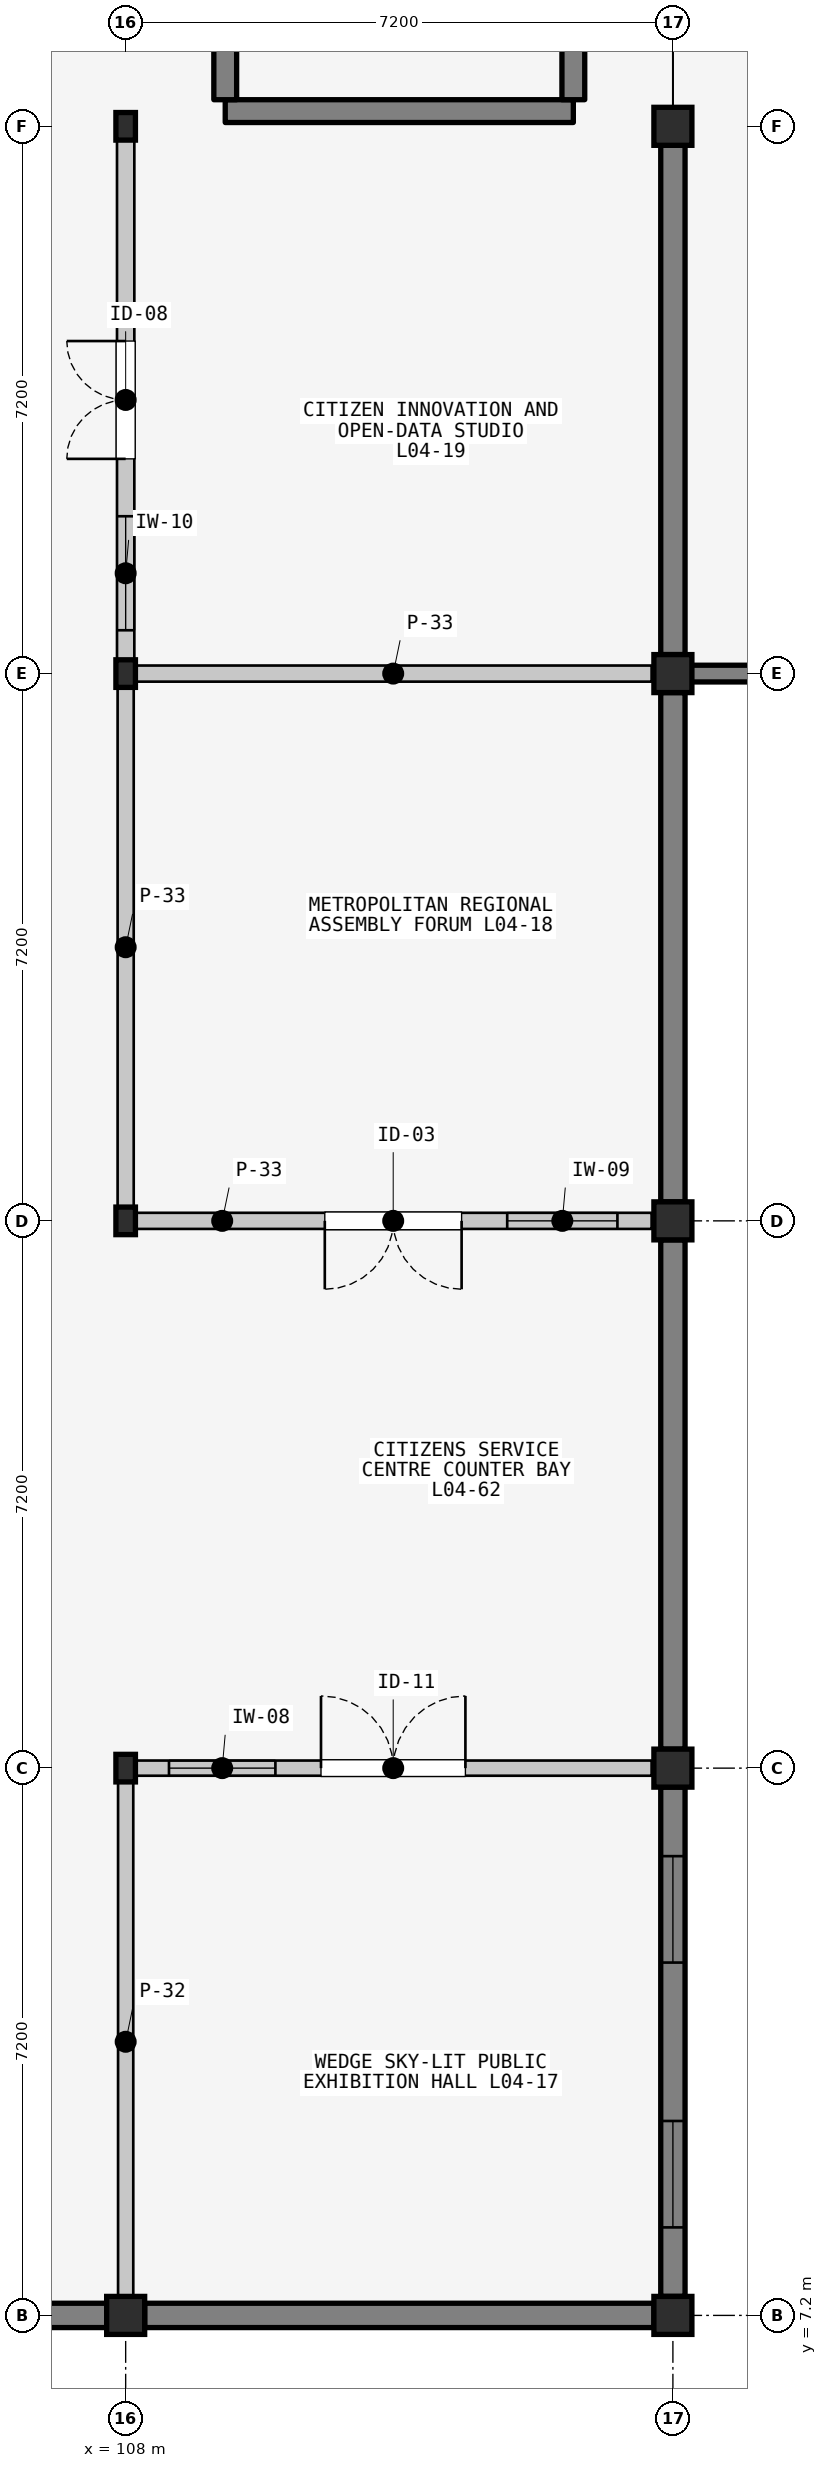
"""IFC4 building model, lengths in metres.
Left out: names, types, materials, properties, quantities, classifications, styles, units other than length and angle.
Written with IfcOpenShell. Run it as: python <this file> out.ifc"""

import sys

from ifc_helpers import new_model, si_unit, direction, frame, frame_2d, origin, origin_2d, place, context, subcontext, project, spatial, rectangle, i_section, extrude, element, fill, save


model = new_model("IFC4")
c1 = context("Model", 3, precision=1e-05, world=origin(), true_north=direction((0.0, 1.0)))
c2 = subcontext(c1, "Body", "Model", "MODEL_VIEW")
j1 = project(units=[si_unit("LENGTHUNIT", "METRE"), si_unit("PLANEANGLEUNIT", "RADIAN")], contexts=[c1])
p1 = place(None, origin())
s1 = spatial("IfcSite", under=j1, at=p1, CompositionType="ELEMENT")
p2 = place(p1, origin())
s2 = spatial("IfcBuilding", under=s1, at=p2, CompositionType="ELEMENT")
p3 = place(p2, frame((0.0, 0.0, 14.1)))
s3 = spatial("IfcBuildingStorey", under=s2, at=p3, CompositionType="ELEMENT", Elevation=14.1)
p4 = place(p3, frame((108.0, 7.2, 0.0), z_axis=(0.0, 0.0, 1.0), x_axis=(1.0, 0.0, 0.0)))
e1 = element("IfcColumn", 1, at=p4, inside=s3, PredefinedType="COLUMN", context=c2, shape_type="SweptSolid", body=[
    extrude(rectangle(XDim=0.5, YDim=0.5, at=origin_2d()), origin(), (0.0, 0.0, 1.0), 5.048),
])
p5 = place(p3, frame((108.0, 14.4, 0.0), z_axis=(0.0, 0.0, 1.0), x_axis=(1.0, 0.0, 0.0)))
e2 = element("IfcColumn", 2, at=p5, inside=s3, PredefinedType="COLUMN", context=c2, shape_type="SweptSolid", body=[
    extrude(i_section(OverallWidth=0.257, OverallDepth=0.363, WebThickness=0.013, FlangeThickness=0.022, FilletRadius=0.015, at=origin_2d()), origin(), (0.0, 0.0, 1.0), 6.39),
])
p6 = place(p3, frame((108.0, 21.6, 0.0), z_axis=(0.0, 0.0, 1.0), x_axis=(1.0, 0.0, 0.0)))
e3 = element("IfcColumn", 3, at=p6, inside=s3, PredefinedType="COLUMN", context=c2, shape_type="SweptSolid", body=[
    extrude(i_section(OverallWidth=0.257, OverallDepth=0.363, WebThickness=0.013, FlangeThickness=0.022, FilletRadius=0.015, at=origin_2d()), origin(), (0.0, 0.0, 1.0), 7.733),
])
p7 = place(p3, frame((108.0, 28.8, 0.0), z_axis=(0.0, 0.0, 1.0), x_axis=(1.0, 0.0, 0.0)))
e4 = element("IfcColumn", 4, at=p7, inside=s3, PredefinedType="COLUMN", context=c2, shape_type="SweptSolid", body=[
    extrude(i_section(OverallWidth=0.257, OverallDepth=0.363, WebThickness=0.013, FlangeThickness=0.022, FilletRadius=0.015, at=origin_2d()), origin(), (0.0, 0.0, 1.0), 9.076),
])
p8 = place(p3, frame((108.0, 36.0, 0.0), z_axis=(0.0, 0.0, 1.0), x_axis=(1.0, 0.0, 0.0)))
e5 = element("IfcColumn", 5, at=p8, inside=s3, PredefinedType="COLUMN", context=c2, shape_type="SweptSolid", body=[
    extrude(i_section(OverallWidth=0.257, OverallDepth=0.363, WebThickness=0.013, FlangeThickness=0.022, FilletRadius=0.015, at=origin_2d()), origin(), (0.0, 0.0, 1.0), 10.419),
])
p9 = place(p3, frame((115.2, 7.2, 0.0), z_axis=(0.0, 0.0, 1.0), x_axis=(1.0, 0.0, 0.0)))
e6 = element("IfcColumn", 6, at=p9, inside=s3, PredefinedType="COLUMN", context=c2, shape_type="SweptSolid", body=[
    extrude(rectangle(XDim=0.5, YDim=0.5, at=origin_2d()), origin(), (0.0, 0.0, 1.0), 5.076),
])
p10 = place(p3, frame((115.2, 14.4, 0.0), z_axis=(0.0, 0.0, 1.0), x_axis=(1.0, 0.0, 0.0)))
e7 = element("IfcColumn", 7, at=p10, inside=s3, PredefinedType="COLUMN", context=c2, shape_type="SweptSolid", body=[
    extrude(rectangle(XDim=0.5, YDim=0.5, at=origin_2d()), origin(), (0.0, 0.0, 1.0), 6.419),
])
p11 = place(p3, frame((115.2, 21.6, 0.0), z_axis=(0.0, 0.0, 1.0), x_axis=(1.0, 0.0, 0.0)))
e8 = element("IfcColumn", 8, at=p11, inside=s3, PredefinedType="COLUMN", context=c2, shape_type="SweptSolid", body=[
    extrude(rectangle(XDim=0.5, YDim=0.5, at=origin_2d()), origin(), (0.0, 0.0, 1.0), 7.762),
])
p12 = place(p3, frame((115.2, 28.8, 0.0), z_axis=(0.0, 0.0, 1.0), x_axis=(1.0, 0.0, 0.0)))
e9 = element("IfcColumn", 9, at=p12, inside=s3, PredefinedType="COLUMN", context=c2, shape_type="SweptSolid", body=[
    extrude(rectangle(XDim=0.5, YDim=0.5, at=origin_2d()), origin(), (0.0, 0.0, 1.0), 9.105),
])
p13 = place(p3, frame((115.2, 36.0, 0.0), z_axis=(0.0, 0.0, 1.0), x_axis=(1.0, 0.0, 0.0)))
e10 = element("IfcColumn", 10, at=p13, inside=s3, PredefinedType="COLUMN", context=c2, shape_type="SweptSolid", body=[
    extrude(rectangle(XDim=0.5, YDim=0.5, at=origin_2d()), origin(), (0.0, 0.0, 1.0), 10.448),
])
p14 = place(p3, frame((107.75, 7.2, 0.0), z_axis=(0.0, 0.0, 1.0), x_axis=(-1.0, 0.0, 0.0)))
e11 = element("IfcWall", 11, at=p14, inside=s3, PredefinedType="SOLIDWALL", context=c2, shape_type="SweptSolid", body=[
    extrude(rectangle(XDim=6.7, YDim=0.32, at=frame_2d((3.35, 0.0))), origin(), (0.0, 0.0, 1.0), 4.292),
])
p15 = place(p14, frame((0.908, 0.0, 0.95)))
e12 = element("IfcOpeningElement", 12, at=p15, cuts=e11, PredefinedType="OPENING", context=c2, shape_type="SweptSolid", body=[
    extrude(rectangle(XDim=1.4, YDim=2.1, at=frame_2d((0.7, 1.05))), frame((0.0, 0.17, 0.0), z_axis=(0.0, -1.0, 0.0), x_axis=(1.0, 0.0, 0.0)), (0.0, 0.0, 1.0), 0.34),
])
p16 = place(p14, frame((4.392, 0.0, 0.95)))
e13 = element("IfcOpeningElement", 13, at=p16, cuts=e11, PredefinedType="OPENING", context=c2, shape_type="SweptSolid", body=[
    extrude(rectangle(XDim=1.4, YDim=2.1, at=frame_2d((0.7, 1.05))), frame((0.0, 0.17, 0.0), z_axis=(0.0, -1.0, 0.0), x_axis=(1.0, 0.0, 0.0)), (0.0, 0.0, 1.0), 0.34),
])
p17 = place(p3, frame((114.95, 7.2, 0.0), z_axis=(0.0, 0.0, 1.0), x_axis=(-1.0, 0.0, 0.0)))
e14 = element("IfcWall", 14, at=p17, inside=s3, PredefinedType="SOLIDWALL", context=c2, shape_type="SweptSolid", body=[
    extrude(rectangle(XDim=6.7, YDim=0.32, at=frame_2d((3.35, 0.0))), origin(), (0.0, 0.0, 1.0), 4.321),
])
p18 = place(p3, frame((115.2, 14.15, 0.0), z_axis=(0.0, 0.0, 1.0), x_axis=(0.0, -1.0, 0.0)))
e15 = element("IfcWall", 15, at=p18, inside=s3, PredefinedType="SOLIDWALL", context=c2, shape_type="SweptSolid", body=[
    extrude(rectangle(XDim=6.7, YDim=0.32, at=frame_2d((3.35, 0.0))), origin(), (0.0, 0.0, 1.0), 4.393),
])
p19 = place(p18, frame((0.908, 0.0, 0.95)))
e16 = element("IfcOpeningElement", 16, at=p19, cuts=e15, PredefinedType="OPENING", context=c2, shape_type="SweptSolid", body=[
    extrude(rectangle(XDim=1.4, YDim=2.1, at=frame_2d((0.7, 1.05))), frame((0.0, 0.17, 0.0), z_axis=(0.0, -1.0, 0.0), x_axis=(1.0, 0.0, 0.0)), (0.0, 0.0, 1.0), 0.34),
])
p20 = place(p18, frame((4.392, 0.0, 0.95)))
e17 = element("IfcOpeningElement", 17, at=p20, cuts=e15, PredefinedType="OPENING", context=c2, shape_type="SweptSolid", body=[
    extrude(rectangle(XDim=1.4, YDim=2.1, at=frame_2d((0.7, 1.05))), frame((0.0, 0.17, 0.0), z_axis=(0.0, -1.0, 0.0), x_axis=(1.0, 0.0, 0.0)), (0.0, 0.0, 1.0), 0.34),
])
p21 = place(p3, frame((115.2, 21.35, 0.0), z_axis=(0.0, 0.0, 1.0), x_axis=(0.0, -1.0, 0.0)))
e18 = element("IfcWall", 18, at=p21, inside=s3, PredefinedType="SOLIDWALL", context=c2, shape_type="SweptSolid", body=[
    extrude(rectangle(XDim=6.7, YDim=0.32, at=frame_2d((3.35, 0.0))), origin(), (0.0, 0.0, 1.0), 5.736),
])
p22 = place(p3, frame((115.2, 28.55, 0.0), z_axis=(0.0, 0.0, 1.0), x_axis=(0.0, -1.0, 0.0)))
e19 = element("IfcWall", 19, at=p22, inside=s3, PredefinedType="SOLIDWALL", context=c2, shape_type="SweptSolid", body=[
    extrude(rectangle(XDim=6.7, YDim=0.32, at=frame_2d((3.35, 0.0))), origin(), (0.0, 0.0, 1.0), 7.079),
])
p23 = place(p3, frame((115.2, 35.75, 0.0), z_axis=(0.0, 0.0, 1.0), x_axis=(0.0, -1.0, 0.0)))
e20 = element("IfcWall", 20, at=p23, inside=s3, PredefinedType="SOLIDWALL", context=c2, shape_type="SweptSolid", body=[
    extrude(rectangle(XDim=6.7, YDim=0.32, at=frame_2d((3.35, 0.0))), origin(), (0.0, 0.0, 1.0), 8.422),
])
p24 = place(p3, frame((122.25, 28.8, 0.0), z_axis=(0.0, 0.0, 1.0), x_axis=(-1.0, 0.0, 0.0)))
e21 = element("IfcWall", 21, at=p24, inside=s3, PredefinedType="PARAPET", context=c2, shape_type="SweptSolid", body=[
    extrude(rectangle(XDim=6.9, YDim=0.22, at=frame_2d((3.45, 0.0))), origin(), (0.0, 0.0, 1.0), 0.85),
])
p25 = place(p3, frame((109.31, 36.2, 0.0), z_axis=(0.0, 0.0, 1.0), x_axis=(1.0, 0.0, 0.0)))
e22 = element("IfcWall", 22, at=p25, inside=s3, PredefinedType="SHEAR", context=c2, shape_type="SweptSolid", body=[
    extrude(rectangle(XDim=4.58, YDim=0.3, at=frame_2d((2.29, 0.0))), origin(), (0.0, 0.0, 1.0), 3.72),
])
for number, where, z_axis, x_axis in (
    (23, (109.31, 36.35, 0.0), (0.0, 0.0, 1.0), (0.0, 1.0, 0.0)),
    (24, (113.89, 36.35, 0.0), (0.0, 0.0, 1.0), (0.0, 1.0, 0.0)),
):
    element("IfcWall", number, at=place(p3, frame(where, z_axis=z_axis, x_axis=x_axis)), inside=s3, PredefinedType="SHEAR", context=c2, shape_type="SweptSolid", body=[
        extrude(rectangle(XDim=9.3, YDim=0.3, at=frame_2d((4.65, 0.0))), origin(), (0.0, 0.0, 1.0), 3.72),
    ])
p26 = place(p3, frame((108.12, 14.4, 0.0), z_axis=(0.0, 0.0, 1.0), x_axis=(1.0, 0.0, 0.0)))
e25 = element("IfcWall", 25, at=p26, inside=s3, PredefinedType="PARTITIONING", context=c2, shape_type="SweptSolid", body=[
    extrude(rectangle(XDim=6.8, YDim=0.2, at=frame_2d((3.4, 0.0))), origin(), (0.0, 0.0, 1.0), 3.72),
])
p27 = place(p26, frame((2.45, 0.0, 0.0)))
e26 = element("IfcOpeningElement", 26, at=p27, cuts=e25, PredefinedType="OPENING", context=c2, shape_type="SweptSolid", body=[
    extrude(rectangle(XDim=1.9, YDim=2.45, at=frame_2d((0.95, 1.225))), frame((0.0, 0.11, 0.0), z_axis=(0.0, -1.0, 0.0), x_axis=(1.0, 0.0, 0.0)), (0.0, 0.0, 1.0), 0.22),
])
p28 = place(p26, frame((0.45, 0.0, 1.05)))
e27 = element("IfcOpeningElement", 27, at=p28, cuts=e25, PredefinedType="OPENING", context=c2, shape_type="SweptSolid", body=[
    extrude(rectangle(XDim=1.4, YDim=1.2, at=frame_2d((0.7, 0.6))), frame((0.0, 0.11, 0.0), z_axis=(0.0, -1.0, 0.0), x_axis=(1.0, 0.0, 0.0)), (0.0, 0.0, 1.0), 0.22),
])
p29 = place(p3, frame((108.0, 7.32, 0.0), z_axis=(0.0, 0.0, 1.0), x_axis=(0.0, 1.0, 0.0)))
e28 = element("IfcWall", 28, at=p29, inside=s3, PredefinedType="PARTITIONING", context=c2, shape_type="SweptSolid", body=[
    extrude(rectangle(XDim=6.96, YDim=0.2, at=frame_2d((3.48, 0.0))), origin(), (0.0, 0.0, 1.0), 3.72),
])
p30 = place(p3, frame((114.92, 21.6, 0.0), z_axis=(0.0, 0.0, 1.0), x_axis=(-1.0, 0.0, 0.0)))
e29 = element("IfcWall", 29, at=p30, inside=s3, PredefinedType="PARTITIONING", context=c2, shape_type="SweptSolid", body=[
    extrude(rectangle(XDim=6.8, YDim=0.212, at=frame_2d((3.4, 0.0))), origin(), (0.0, 0.0, 1.0), 3.72),
])
p31 = place(p30, frame((2.5, 0.0, 0.0)))
e30 = element("IfcOpeningElement", 30, at=p31, cuts=e29, PredefinedType="OPENING", context=c2, shape_type="SweptSolid", body=[
    extrude(rectangle(XDim=1.8, YDim=2.4, at=frame_2d((0.9, 1.2))), frame((0.0, 0.116, 0.0), z_axis=(0.0, -1.0, 0.0), x_axis=(1.0, 0.0, 0.0)), (0.0, 0.0, 1.0), 0.232),
])
p32 = place(p30, frame((0.45, 0.0, 1.05)))
e31 = element("IfcOpeningElement", 31, at=p32, cuts=e29, PredefinedType="OPENING", context=c2, shape_type="SweptSolid", body=[
    extrude(rectangle(XDim=1.45, YDim=1.15, at=frame_2d((0.725, 0.575))), frame((0.0, 0.116, 0.0), z_axis=(0.0, -1.0, 0.0), x_axis=(1.0, 0.0, 0.0)), (0.0, 0.0, 1.0), 0.232),
])
p33 = place(p3, frame((108.12, 28.8, 0.0), z_axis=(0.0, 0.0, 1.0), x_axis=(1.0, 0.0, 0.0)))
e32 = element("IfcWall", 32, at=p33, inside=s3, PredefinedType="PARTITIONING", context=c2, shape_type="SweptSolid", body=[
    extrude(rectangle(XDim=6.8, YDim=0.212, at=frame_2d((3.4, 0.0))), origin(), (0.0, 0.0, 1.0), 3.72),
])
p34 = place(p3, frame((108.0, 21.72, 0.0), z_axis=(0.0, 0.0, 1.0), x_axis=(0.0, 1.0, 0.0)))
e33 = element("IfcWall", 33, at=p34, inside=s3, PredefinedType="PARTITIONING", context=c2, shape_type="SweptSolid", body=[
    extrude(rectangle(XDim=6.96, YDim=0.212, at=frame_2d((3.48, 0.0))), origin(), (0.0, 0.0, 1.0), 3.72),
])
p35 = place(p3, frame((108.0, 28.92, 0.0), z_axis=(0.0, 0.0, 1.0), x_axis=(0.0, 1.0, 0.0)))
e34 = element("IfcWall", 34, at=p35, inside=s3, PredefinedType="PARTITIONING", context=c2, shape_type="SweptSolid", body=[
    extrude(rectangle(XDim=6.96, YDim=0.228, at=frame_2d((3.48, 0.0))), origin(), (0.0, 0.0, 1.0), 3.72),
])
p36 = place(p35, frame((2.705, 0.0, 0.0)))
e35 = element("IfcOpeningElement", 35, at=p36, cuts=e34, PredefinedType="OPENING", context=c2, shape_type="SweptSolid", body=[
    extrude(rectangle(XDim=1.55, YDim=2.3, at=frame_2d((0.775, 1.15))), frame((0.0, 0.124, 0.0), z_axis=(0.0, -1.0, 0.0), x_axis=(1.0, 0.0, 0.0)), (0.0, 0.0, 1.0), 0.248),
])
p37 = place(p35, frame((0.45, 0.0, 1.05)))
e36 = element("IfcOpeningElement", 36, at=p37, cuts=e34, PredefinedType="OPENING", context=c2, shape_type="SweptSolid", body=[
    extrude(rectangle(XDim=1.5, YDim=1.15, at=frame_2d((0.75, 0.575))), frame((0.0, 0.124, 0.0), z_axis=(0.0, -1.0, 0.0), x_axis=(1.0, 0.0, 0.0)), (0.0, 0.0, 1.0), 0.248),
])
p38 = place(p19, origin())
e37 = element("IfcWindow", 37, at=p38, inside=s3, PartitioningType="SINGLE_PANEL", PredefinedType="WINDOW", context=c2, shape_type="SweptSolid", body=[
    extrude(rectangle(XDim=1.4, YDim=2.1, at=frame_2d((0.7, 1.05))), frame((0.0, 0.03, 0.0), z_axis=(0.0, -1.0, 0.0), x_axis=(1.0, 0.0, 0.0)), (0.0, 0.0, 1.0), 0.06),
])
fill(e16, e37)
p39 = place(p20, origin())
e38 = element("IfcWindow", 38, at=p39, inside=s3, PartitioningType="SINGLE_PANEL", PredefinedType="WINDOW", context=c2, shape_type="SweptSolid", body=[
    extrude(rectangle(XDim=1.4, YDim=2.1, at=frame_2d((0.7, 1.05))), frame((0.0, 0.03, 0.0), z_axis=(0.0, -1.0, 0.0), x_axis=(1.0, 0.0, 0.0)), (0.0, 0.0, 1.0), 0.06),
])
fill(e17, e38)
p40 = place(p27, origin())
e39 = element("IfcDoor", 39, at=p40, inside=s3, OperationType="DOUBLE_DOOR_SINGLE_SWING", PredefinedType="DOOR", context=c2, shape_type="SweptSolid", body=[
    extrude(rectangle(XDim=1.9, YDim=2.45, at=frame_2d((0.95, 1.225))), frame((0.0, 0.025, 0.0), z_axis=(0.0, -1.0, 0.0), x_axis=(1.0, 0.0, 0.0)), (0.0, 0.0, 1.0), 0.05),
])
fill(e26, e39)
p41 = place(p28, origin())
e40 = element("IfcWindow", 40, at=p41, inside=s3, PartitioningType="SINGLE_PANEL", PredefinedType="WINDOW", context=c2, shape_type="SweptSolid", body=[
    extrude(rectangle(XDim=1.4, YDim=1.2, at=frame_2d((0.7, 0.6))), frame((0.0, 0.03, 0.0), z_axis=(0.0, -1.0, 0.0), x_axis=(1.0, 0.0, 0.0)), (0.0, 0.0, 1.0), 0.06),
])
fill(e27, e40)
p42 = place(p31, origin())
e41 = element("IfcDoor", 41, at=p42, inside=s3, OperationType="DOUBLE_DOOR_SINGLE_SWING", PredefinedType="DOOR", context=c2, shape_type="SweptSolid", body=[
    extrude(rectangle(XDim=1.8, YDim=2.4, at=frame_2d((0.9, 1.2))), frame((0.0, 0.025, 0.0), z_axis=(0.0, -1.0, 0.0), x_axis=(1.0, 0.0, 0.0)), (0.0, 0.0, 1.0), 0.05),
])
fill(e30, e41)
p43 = place(p32, origin())
e42 = element("IfcWindow", 42, at=p43, inside=s3, PartitioningType="SINGLE_PANEL", PredefinedType="WINDOW", context=c2, shape_type="SweptSolid", body=[
    extrude(rectangle(XDim=1.45, YDim=1.15, at=frame_2d((0.725, 0.575))), frame((0.0, 0.03, 0.0), z_axis=(0.0, -1.0, 0.0), x_axis=(1.0, 0.0, 0.0)), (0.0, 0.0, 1.0), 0.06),
])
fill(e31, e42)
p44 = place(p36, origin())
e43 = element("IfcDoor", 43, at=p44, inside=s3, OperationType="DOUBLE_DOOR_SINGLE_SWING", PredefinedType="DOOR", context=c2, shape_type="SweptSolid", body=[
    extrude(rectangle(XDim=1.55, YDim=2.3, at=frame_2d((0.775, 1.15))), frame((0.0, 0.025, 0.0), z_axis=(0.0, -1.0, 0.0), x_axis=(1.0, 0.0, 0.0)), (0.0, 0.0, 1.0), 0.05),
])
fill(e35, e43)
p45 = place(p37, origin())
e44 = element("IfcWindow", 44, at=p45, inside=s3, PartitioningType="SINGLE_PANEL", PredefinedType="WINDOW", context=c2, shape_type="SweptSolid", body=[
    extrude(rectangle(XDim=1.5, YDim=1.15, at=frame_2d((0.75, 0.575))), frame((0.0, 0.03, 0.0), z_axis=(0.0, -1.0, 0.0), x_axis=(1.0, 0.0, 0.0)), (0.0, 0.0, 1.0), 0.06),
])
fill(e36, e44)
save(model, sys.argv[1])
